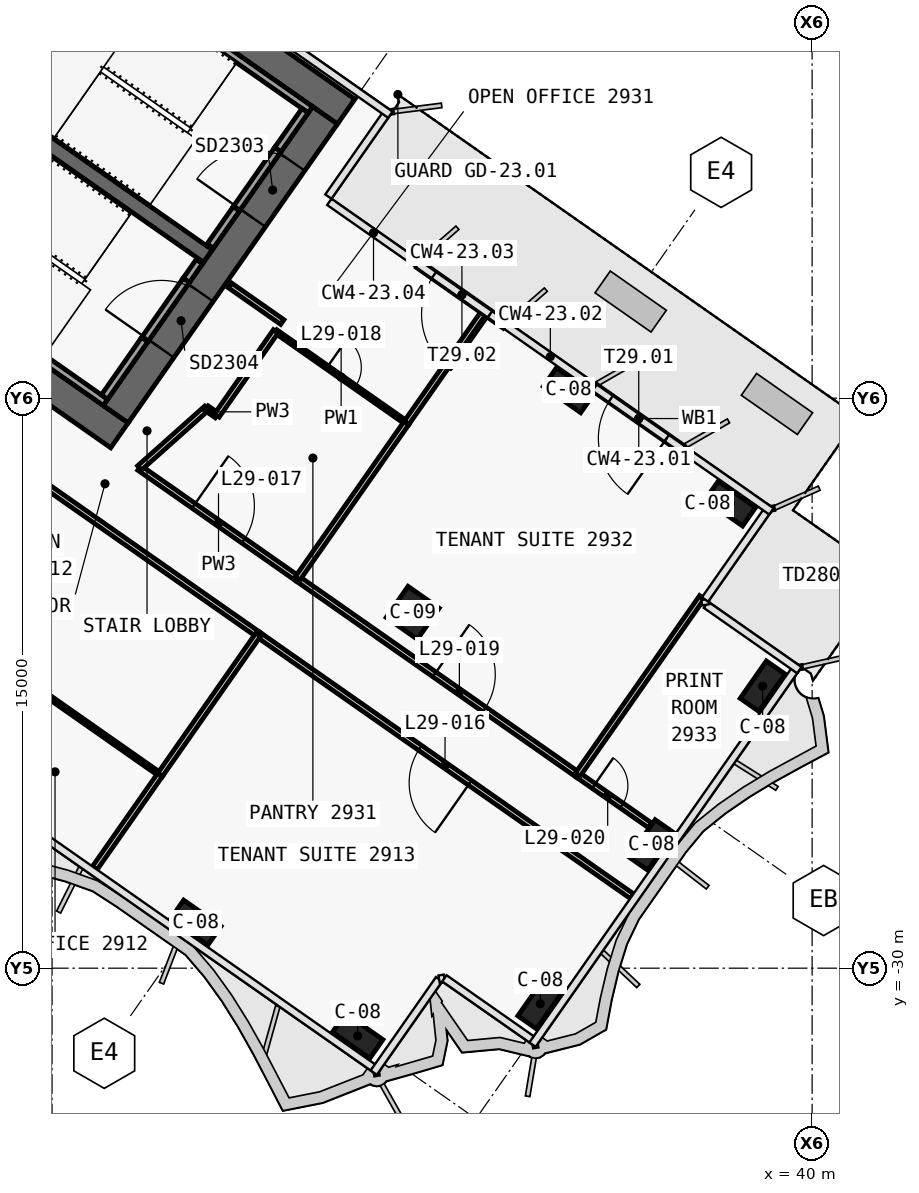
"""IFC4 building model, lengths in metres.
Left out: names, types, materials, properties, quantities, classifications, styles, units other than length and angle.
Written with IfcOpenShell. Run it as: python <this file> out.ifc"""

import sys

from ifc_helpers import new_model, si_unit, direction, frame, frame_2d, origin, origin_2d, place, context, subcontext, project, spatial, polyline, rectangle, outline, extrude, element, fill, save


model = new_model("IFC4")
c1 = context("Model", 3, precision=1e-05, world=origin(), true_north=direction((0.0, 1.0)))
c2 = subcontext(c1, "Body", "Model", "MODEL_VIEW")
j1 = project(units=[si_unit("LENGTHUNIT", "METRE"), si_unit("PLANEANGLEUNIT", "RADIAN")], contexts=[c1])
p1 = place(None, origin())
s1 = spatial("IfcSite", under=j1, at=p1, CompositionType="ELEMENT")
p2 = place(p1, origin())
s2 = spatial("IfcBuilding", under=s1, at=p2, CompositionType="ELEMENT")
p3 = place(p2, frame((0.0, 0.0, 132.0)))
s3 = spatial("IfcBuildingStorey", under=s2, at=p3, CompositionType="ELEMENT", Elevation=132.0)
p4 = place(p3, frame((-0.029, 11.984, 0.0), z_axis=(0.0, 0.0, 1.0), x_axis=(0.819151382952, -0.573577380837, 0.0)))
e1 = element("IfcWall", 1, at=p4, inside=s3, PredefinedType="SHEAR", context=c2, shape_type="SweptSolid", body=[
    extrude(outline(polyline([(33.898, 0.4), (-0.0, 0.4), (0.56, -0.4), (33.898, -0.4), (33.898, 0.4)])), origin(), (0.0, 0.0, 1.0), 3.9),
])
p5 = place(p3, frame((-0.029, -0.712, 0.0), z_axis=(0.0, 0.0, 1.0), x_axis=(0.819151758019, -0.573576845187, 0.0)))
e2 = element("IfcWall", 2, at=p5, inside=s3, PredefinedType="SHEAR", context=c2, shape_type="SweptSolid", body=[
    extrude(outline(polyline([(26.616, 0.4), (-0.0, 0.4), (0.56, -0.4), (26.616, -0.4), (26.616, 0.4)])), origin(), (0.0, 0.0, 1.0), 3.9),
])
p6 = place(p5, frame((6.666, 0.0, 0.0)))
e3 = element("IfcOpeningElement", 3, at=p6, cuts=e2, PredefinedType="OPENING", context=c2, shape_type="SweptSolid", body=[
    extrude(rectangle(XDim=1.5, YDim=2.1, at=frame_2d((0.75, 1.05))), frame((0.0, 0.41, 0.0), z_axis=(0.0, -1.0, 0.0), x_axis=(1.0, 0.0, 0.0)), (0.0, 0.0, 1.0), 0.82),
])
p7 = place(p5, frame((12.366, 0.0, 0.0)))
e4 = element("IfcOpeningElement", 4, at=p7, cuts=e2, PredefinedType="OPENING", context=c2, shape_type="SweptSolid", body=[
    extrude(rectangle(XDim=1.5, YDim=2.1, at=frame_2d((0.75, 1.05))), frame((0.0, 0.41, 0.0), z_axis=(0.0, -1.0, 0.0), x_axis=(1.0, 0.0, 0.0)), (0.0, 0.0, 1.0), 0.82),
])
p8 = place(p3, frame((21.675, -15.421, 0.0), z_axis=(0.0, 0.0, 1.0), x_axis=(0.573581815061, 0.819148278049, 0.0)))
e5 = element("IfcWall", 5, at=p8, inside=s3, PredefinedType="SHEAR", context=c2, shape_type="SweptSolid", body=[
    extrude(outline(polyline([(9.6, 0.4), (0.0, 0.4), (0.0, -0.4), (9.6, -0.4), (9.6, 0.4)])), origin(), (0.0, 0.0, 1.0), 3.9),
])
p9 = place(p8, frame((6.3, 0.0, 0.0)))
e6 = element("IfcOpeningElement", 6, at=p9, cuts=e5, PredefinedType="OPENING", context=c2, shape_type="SweptSolid", body=[
    extrude(rectangle(XDim=1.8, YDim=2.1, at=frame_2d((0.9, 1.05))), frame((0.0, 0.41, 0.0), z_axis=(0.0, -1.0, 0.0), x_axis=(1.0, 0.0, 0.0)), (0.0, 0.0, 1.0), 0.82),
])
p10 = place(p8, frame((2.1, 0.0, 0.0)))
e7 = element("IfcOpeningElement", 7, at=p10, cuts=e5, PredefinedType="OPENING", context=c2, shape_type="SweptSolid", body=[
    extrude(rectangle(XDim=1.8, YDim=2.1, at=frame_2d((0.9, 1.05))), frame((0.0, 0.41, 0.0), z_axis=(0.0, -1.0, 0.0), x_axis=(1.0, 0.0, 0.0)), (0.0, 0.0, 1.0), 0.82),
])
p11 = place(p3, frame((17.498, -6.392, 0.0), z_axis=(0.0, 0.0, 1.0), x_axis=(0.573611936273, 0.819127185829, 0.0)))
e8 = element("IfcWall", 8, at=p11, inside=s3, PredefinedType="SHEAR", context=c2, shape_type="SweptSolid", body=[
    extrude(outline(polyline([(4.6, -0.2), (4.6, 0.2), (0.0, 0.2), (0.0, -0.2), (4.6, -0.2)])), origin(), (0.0, 0.0, 1.0), 3.9),
])
p12 = place(p3, frame((2.638, 3.768, 0.0), z_axis=(0.0, 0.0, 1.0), x_axis=(0.81915267502, -0.573575535572, 0.0)))
e9 = element("IfcWall", 9, at=p12, inside=s3, PredefinedType="SHEAR", context=c2, shape_type="SweptSolid", body=[
    extrude(outline(polyline([(0.0, 0.2), (0.0, -0.2), (26.2, -0.2), (26.2, 0.2), (0.0, 0.2)])), origin(), (0.0, 0.0, 1.0), 3.9),
])
p13 = place(p12, frame((9.637, 0.0, 0.0)))
e10 = element("IfcOpeningElement", 10, at=p13, cuts=e9, PredefinedType="OPENING", context=c2, shape_type="SweptSolid", body=[
    extrude(rectangle(XDim=1.2, YDim=2.1, at=frame_2d((0.6, 1.05))), frame((0.0, 0.21, 0.0), z_axis=(0.0, -1.0, 0.0), x_axis=(1.0, 0.0, 0.0)), (0.0, 0.0, 1.0), 0.42),
])
p14 = place(p12, frame((11.812, 0.0, 0.0)))
e11 = element("IfcOpeningElement", 11, at=p14, cuts=e9, PredefinedType="OPENING", context=c2, shape_type="SweptSolid", body=[
    extrude(rectangle(XDim=1.2, YDim=2.1, at=frame_2d((0.6, 1.05))), frame((0.0, 0.21, 0.0), z_axis=(0.0, -1.0, 0.0), x_axis=(1.0, 0.0, 0.0)), (0.0, 0.0, 1.0), 0.42),
])
p15 = place(p12, frame((13.988, 0.0, 0.0)))
e12 = element("IfcOpeningElement", 12, at=p15, cuts=e9, PredefinedType="OPENING", context=c2, shape_type="SweptSolid", body=[
    extrude(rectangle(XDim=1.2, YDim=2.1, at=frame_2d((0.6, 1.05))), frame((0.0, 0.21, 0.0), z_axis=(0.0, -1.0, 0.0), x_axis=(1.0, 0.0, 0.0)), (0.0, 0.0, 1.0), 0.42),
])
p16 = place(p12, frame((16.262, 0.0, 0.0)))
e13 = element("IfcOpeningElement", 13, at=p16, cuts=e9, PredefinedType="OPENING", context=c2, shape_type="SweptSolid", body=[
    extrude(rectangle(XDim=1.0, YDim=2.1, at=frame_2d((0.5, 1.05))), frame((0.0, 0.21, 0.0), z_axis=(0.0, -1.0, 0.0), x_axis=(1.0, 0.0, 0.0)), (0.0, 0.0, 1.0), 0.42),
])
for number, where, z_axis, x_axis in (
    (14, (23.782, -28.799, 0.0), (0.0, 0.0, 1.0), (0.819, -0.574, 0.0)),
    (15, (28.042, -31.782, 0.0), (0.0, 0.0, 1.0), (0.819, -0.574, 0.0)),
    (16, (33.591, -14.792, 0.0), (0.0, 0.0, 1.0), (0.819, -0.574, 0.0)),
    (17, (37.85, -17.774, 0.0), (0.0, 0.0, 1.0), (0.819, -0.574, 0.0)),
    (18, (32.847, -30.935, 0.0), (0.0, 0.0, 1.0), (0.574, 0.819, 0.0)),
    (19, (35.772, -26.757, 0.0), (0.0, 0.0, 1.0), (0.574, 0.819, 0.0)),
    (20, (38.698, -22.579, 0.0), (0.0, 0.0, 1.0), (0.574, 0.819, 0.0)),
):
    element("IfcColumn", number, at=place(p3, frame(where, z_axis=z_axis, x_axis=x_axis)), inside=s3, PredefinedType="COLUMN", context=c2, shape_type="SweptSolid", body=[
        extrude(rectangle(XDim=1.2, YDim=0.6, at=origin_2d()), origin(), (0.0, 0.0, 1.0), 3.9),
    ])
p17 = place(p3, frame((29.49, -20.649, 0.0), z_axis=(0.0, 0.0, 1.0), x_axis=(0.819152044289, -0.573576436351, 0.0)))
e21 = element("IfcColumn", 21, at=p17, inside=s3, PredefinedType="COLUMN", context=c2, shape_type="SweptSolid", body=[
    extrude(rectangle(XDim=1.0, YDim=1.0, at=origin_2d()), origin(), (0.0, 0.0, 1.0), 3.9),
])
p18 = place(p3, frame((20.243, -2.821, 0.0), z_axis=(0.0, 0.0, 1.0), x_axis=(0.819141584393, -0.57359137434, 0.0)))
e22 = element("IfcWall", 22, at=p18, inside=s3, PredefinedType="SOLIDWALL", context=c2, shape_type="SweptSolid", body=[
    extrude(rectangle(XDim=8.0, YDim=0.2, at=frame_2d((4.0, 0.0))), origin(), (0.0, 0.0, 1.0), 3.62),
])
p19 = place(p3, frame((24.162, -10.998, 0.0), z_axis=(0.0, 0.0, 1.0), x_axis=(0.573612502218, 0.819126789514, 0.0)))
e23 = element("IfcWall", 23, at=p19, inside=s3, PredefinedType="SOLIDWALL", context=c2, shape_type="SweptSolid", body=[
    extrude(rectangle(XDim=1.2, YDim=0.2, at=frame_2d((0.6, 0.0))), origin(), (0.0, 0.0, 1.0), 3.62),
])
p20 = place(p3, frame((25.94, -8.458, 0.0), z_axis=(0.0, 0.0, 1.0), x_axis=(0.573619628835, 0.819121798889, 0.0)))
e24 = element("IfcWall", 24, at=p20, inside=s3, PredefinedType="SOLIDWALL", context=c2, shape_type="SweptSolid", body=[
    extrude(rectangle(XDim=1.25, YDim=0.2, at=frame_2d((0.625, 0.0))), origin(), (0.0, 0.0, 1.0), 3.62),
])
p21 = place(p3, frame((24.85, -10.014, 2.15), z_axis=(0.0, 0.0, 1.0), x_axis=(0.573505465124, 0.819201734296, 0.0)))
e25 = element("IfcWall", 25, at=p21, inside=s3, PredefinedType="SOLIDWALL", context=c2, shape_type="SweptSolid", body=[
    extrude(rectangle(XDim=1.9, YDim=0.2, at=frame_2d((0.95, 0.0))), origin(), (0.0, 0.0, 1.0), 1.47),
])
p22 = place(p3, frame((14.851, -10.521, 0.0), z_axis=(0.0, 0.0, 1.0), x_axis=(0.819141584393, -0.57359137434, 0.0)))
e26 = element("IfcWall", 26, at=p22, inside=s3, PredefinedType="SOLIDWALL", context=c2, shape_type="SweptSolid", body=[
    extrude(rectangle(XDim=8.0, YDim=0.2, at=frame_2d((4.0, 0.0))), origin(), (0.0, 0.0, 1.0), 3.62),
])
p23 = place(p3, frame((21.38, -14.97, 0.0), z_axis=(0.0, 0.0, 1.0), x_axis=(0.573559770908, 0.819163713305, 0.0)))
e27 = element("IfcWall", 27, at=p23, inside=s3, PredefinedType="SOLIDWALL", context=c2, shape_type="SweptSolid", body=[
    extrude(rectangle(XDim=1.85, YDim=0.2, at=frame_2d((0.925, 0.0))), origin(), (0.0, 0.0, 1.0), 3.62),
])
p24 = place(p3, frame((23.531, -11.898, 0.0), z_axis=(0.0, 0.0, 1.0), x_axis=(0.573708088123, 0.819059844958, 0.0)))
e28 = element("IfcWall", 28, at=p24, inside=s3, PredefinedType="SOLIDWALL", context=c2, shape_type="SweptSolid", body=[
    extrude(rectangle(XDim=0.6, YDim=0.2, at=frame_2d((0.3, 0.0))), origin(), (0.0, 0.0, 1.0), 3.62),
])
p25 = place(p3, frame((22.441, -13.455, 2.15), z_axis=(0.0, 0.0, 1.0), x_axis=(0.573591692345, 0.819141361715, 0.0)))
e29 = element("IfcWall", 29, at=p25, inside=s3, PredefinedType="SOLIDWALL", context=c2, shape_type="SweptSolid", body=[
    extrude(rectangle(XDim=1.9, YDim=0.2, at=frame_2d((0.95, 0.0))), origin(), (0.0, 0.0, 1.0), 1.47),
])
p26 = place(p3, frame((36.576, -16.333, 0.0), z_axis=(0.0, 0.0, 1.0), x_axis=(-0.81917415632, 0.573544855802, 0.0)))
e30 = element("IfcWall", 30, at=p26, inside=s3, PredefinedType="SOLIDWALL", context=c2, shape_type="SweptSolid", body=[
    extrude(rectangle(XDim=2.78, YDim=0.2, at=frame_2d((1.39, 0.0))), origin(), (0.0, 0.0, 1.0), 3.62),
])
p27 = place(p26, frame((0.49, 0.0, 0.0)))
e31 = element("IfcOpeningElement", 31, at=p27, cuts=e30, PredefinedType="OPENING", context=c2, shape_type="SweptSolid", body=[
    extrude(rectangle(XDim=1.8, YDim=2.4, at=frame_2d((0.9, 1.2))), frame((0.0, 0.11, 0.0), z_axis=(0.0, -1.0, 0.0), x_axis=(1.0, 0.0, 0.0)), (0.0, 0.0, 1.0), 0.22),
])
p28 = place(p3, frame((31.924, -13.075, 0.0), z_axis=(0.0, 0.0, 1.0), x_axis=(-0.819145264869, 0.573586118244, 0.0)))
e32 = element("IfcWall", 32, at=p28, inside=s3, PredefinedType="SOLIDWALL", context=c2, shape_type="SweptSolid", body=[
    extrude(rectangle(XDim=2.78, YDim=0.2, at=frame_2d((1.39, 0.0))), origin(), (0.0, 0.0, 1.0), 3.62),
])
p29 = place(p28, frame((0.49, 0.0, 0.0)))
e33 = element("IfcOpeningElement", 33, at=p29, cuts=e32, PredefinedType="OPENING", context=c2, shape_type="SweptSolid", body=[
    extrude(rectangle(XDim=1.8, YDim=2.4, at=frame_2d((0.9, 1.2))), frame((0.0, 0.11, 0.0), z_axis=(0.0, -1.0, 0.0), x_axis=(1.0, 0.0, 0.0)), (0.0, 0.0, 1.0), 0.22),
])
p30 = place(p3, frame((22.3, -16.835, 0.0), z_axis=(0.0, 0.0, 1.0), x_axis=(0.819173202411, -0.573546218235, 0.0)))
e34 = element("IfcWall", 34, at=p30, inside=s3, PredefinedType="PARTITIONING", context=c2, shape_type="SweptSolid", body=[
    extrude(rectangle(XDim=5.079, YDim=0.15, at=frame_2d((2.54, 0.0))), origin(), (0.0, 0.0, 1.0), 3.0),
])
p31 = place(p30, frame((1.74, 0.0, 0.0)))
e35 = element("IfcOpeningElement", 35, at=p31, cuts=e34, PredefinedType="OPENING", context=c2, shape_type="SweptSolid", body=[
    extrude(rectangle(XDim=1.6, YDim=2.1, at=frame_2d((0.8, 1.05))), frame((0.0, 0.085, 0.0), z_axis=(0.0, -1.0, 0.0), x_axis=(1.0, 0.0, 0.0)), (0.0, 0.0, 1.0), 0.17),
])
p32 = place(p3, frame((26.457, -19.746, 0.0), z_axis=(0.0, 0.0, 1.0), x_axis=(0.819164400877, -0.57355878891, 0.0)))
e36 = element("IfcWall", 36, at=p32, inside=s3, PredefinedType="PARTITIONING", context=c2, shape_type="SweptSolid", body=[
    extrude(rectangle(XDim=9.004, YDim=0.15, at=frame_2d((4.502, 0.0))), origin(), (0.0, 0.0, 1.0), 3.0),
])
p33 = place(p32, frame((4.402, 0.0, 0.0)))
e37 = element("IfcOpeningElement", 37, at=p33, cuts=e36, PredefinedType="OPENING", context=c2, shape_type="SweptSolid", body=[
    extrude(rectangle(XDim=1.6, YDim=2.1, at=frame_2d((0.8, 1.05))), frame((0.0, 0.085, 0.0), z_axis=(0.0, -1.0, 0.0), x_axis=(1.0, 0.0, 0.0)), (0.0, 0.0, 1.0), 0.17),
])
p34 = place(p3, frame((33.829, -24.908, 0.0), z_axis=(0.0, 0.0, 1.0), x_axis=(0.81915814261, -0.573567726947, 0.0)))
e38 = element("IfcWall", 38, at=p34, inside=s3, PredefinedType="PARTITIONING", context=c2, shape_type="SweptSolid", body=[
    extrude(rectangle(XDim=2.332, YDim=0.15, at=frame_2d((1.166, 0.0))), origin(), (0.0, 0.0, 1.0), 3.0),
])
p35 = place(p34, frame((0.516, 0.0, 0.0)))
e39 = element("IfcOpeningElement", 39, at=p35, cuts=e38, PredefinedType="OPENING", context=c2, shape_type="SweptSolid", body=[
    extrude(rectangle(XDim=0.9, YDim=2.1, at=frame_2d((0.45, 1.05))), frame((0.0, 0.085, 0.0), z_axis=(0.0, -1.0, 0.0), x_axis=(1.0, 0.0, 0.0)), (0.0, 0.0, 1.0), 0.17),
])
p36 = place(p3, frame((25.428, -21.222, 0.0), z_axis=(0.0, 0.0, 1.0), x_axis=(-0.819170120389, 0.573550620139, 0.0)))
e40 = element("IfcWall", 40, at=p36, inside=s3, PredefinedType="PARTITIONING", context=c2, shape_type="SweptSolid", body=[
    extrude(rectangle(XDim=18.004, YDim=0.15, at=frame_2d((9.002, 0.0))), origin(), (0.0, 0.0, 1.0), 3.0),
])
p37 = place(p36, frame((8.202, 0.0, 0.0)))
e41 = element("IfcOpeningElement", 41, at=p37, cuts=e40, PredefinedType="OPENING", context=c2, shape_type="SweptSolid", body=[
    extrude(rectangle(XDim=1.6, YDim=2.1, at=frame_2d((0.8, 1.05))), frame((0.0, 0.085, 0.0), z_axis=(0.0, -1.0, 0.0), x_axis=(1.0, 0.0, 0.0)), (0.0, 0.0, 1.0), 0.17),
])
p38 = place(p3, frame((35.256, -28.104, 0.0), z_axis=(0.0, 0.0, 1.0), x_axis=(-0.819174576401, 0.573544255814, 0.0)))
e42 = element("IfcWall", 42, at=p38, inside=s3, PredefinedType="PARTITIONING", context=c2, shape_type="SweptSolid", body=[
    extrude(rectangle(XDim=12.002, YDim=0.15, at=frame_2d((6.001, 0.0))), origin(), (0.0, 0.0, 1.0), 2.9),
])
p39 = place(p38, frame((5.201, 0.0, 0.0)))
e43 = element("IfcOpeningElement", 43, at=p39, cuts=e42, PredefinedType="OPENING", context=c2, shape_type="SweptSolid", body=[
    extrude(rectangle(XDim=1.6, YDim=2.1, at=frame_2d((0.8, 1.05))), frame((0.0, 0.085, 0.0), z_axis=(0.0, -1.0, 0.0), x_axis=(1.0, 0.0, 0.0)), (0.0, 0.0, 1.0), 0.17),
])
p40 = place(p3, frame((25.886, -13.242, 0.0), z_axis=(0.0, 0.0, 1.0), x_axis=(0.819160910421, -0.573563773994, 0.0)))
e44 = element("IfcWall", 44, at=p40, inside=s3, PredefinedType="PARTITIONING", context=c2, shape_type="SweptSolid", body=[
    extrude(rectangle(XDim=4.2, YDim=0.1, at=frame_2d((2.1, 0.0))), origin(), (0.0, 0.0, 1.0), 3.62),
])
p41 = place(p40, frame((1.65, 0.0, 0.0)))
e45 = element("IfcOpeningElement", 45, at=p41, cuts=e44, PredefinedType="OPENING", context=c2, shape_type="SweptSolid", body=[
    extrude(rectangle(XDim=0.9, YDim=2.1, at=frame_2d((0.45, 1.05))), frame((0.0, 0.06, 0.0), z_axis=(0.0, -1.0, 0.0), x_axis=(1.0, 0.0, 0.0)), (0.0, 0.0, 1.0), 0.12),
])
p42 = place(p3, frame((31.334, -12.784, 0.0), z_axis=(0.0, 0.0, 1.0), x_axis=(-0.573555999232, -0.819166354134, 0.0)))
e46 = element("IfcWall", 46, at=p42, inside=s3, PredefinedType="PARTITIONING", context=c2, shape_type="SweptSolid", body=[
    extrude(rectangle(XDim=3.499, YDim=0.15, at=frame_2d((1.75, 0.0))), origin(), (0.0, 0.0, 1.0), 3.0),
])
p43 = place(p3, frame((26.058, -12.997, 0.0), z_axis=(0.0, 0.0, 1.0), x_axis=(-0.819109000826, 0.573637903879, 0.0)))
e47 = element("IfcWall", 47, at=p43, inside=s3, PredefinedType="PARTITIONING", context=c2, shape_type="SweptSolid", body=[
    extrude(rectangle(XDim=1.68, YDim=0.15, at=frame_2d((0.84, 0.0))), origin(), (0.0, 0.0, 1.0), 3.62),
])
p44 = place(p3, frame((29.326, -15.651, 0.0), z_axis=(0.0, 0.0, 1.0), x_axis=(-0.573563925118, -0.819160804606, 0.0)))
e48 = element("IfcWall", 48, at=p44, inside=s3, PredefinedType="PARTITIONING", context=c2, shape_type="SweptSolid", body=[
    extrude(rectangle(XDim=5.0, YDim=0.15, at=frame_2d((2.5, 0.0))), origin(), (0.0, 0.0, 1.0), 3.0),
])
p45 = place(p3, frame((22.301, -16.836, 0.0), z_axis=(0.0, 0.0, 1.0), x_axis=(0.746924703007, 0.664908631345, 0.0)))
e49 = element("IfcWall", 49, at=p45, inside=s3, PredefinedType="PARTITIONING", context=c2, shape_type="SweptSolid", body=[
    extrude(rectangle(XDim=2.364, YDim=0.15, at=frame_2d((1.182, 0.0))), origin(), (0.0, 0.0, 1.0), 3.0),
])
p46 = place(p3, frame((24.067, -15.265, 0.0), z_axis=(0.0, 0.0, 1.0), x_axis=(0.819092976344, -0.573660784876, 0.0)))
e50 = element("IfcWall", 50, at=p46, inside=s3, PredefinedType="PARTITIONING", context=c2, shape_type="SweptSolid", body=[
    extrude(rectangle(XDim=0.33, YDim=0.15, at=frame_2d((0.165, 0.0))), origin(), (0.0, 0.0, 1.0), 3.62),
])
p47 = place(p3, frame((24.337, -15.454, 0.0), z_axis=(0.0, 0.0, 1.0), x_axis=(0.573626181702, 0.819117209968, 0.0)))
e51 = element("IfcWall", 51, at=p47, inside=s3, PredefinedType="PARTITIONING", context=c2, shape_type="SweptSolid", body=[
    extrude(rectangle(XDim=2.7, YDim=0.15, at=frame_2d((1.35, 0.0))), origin(), (0.0, 0.0, 1.0), 3.62),
])
p48 = place(p3, frame((37.101, -20.239, 0.0), z_axis=(0.0, 0.0, 1.0), x_axis=(-0.573565788323, -0.819159500015, 0.0)))
e52 = element("IfcWall", 52, at=p48, inside=s3, PredefinedType="PARTITIONING", context=c2, shape_type="SweptSolid", body=[
    extrude(rectangle(XDim=5.702, YDim=0.15, at=frame_2d((2.851, 0.0))), origin(), (0.0, 0.0, 1.0), 3.0),
])
p49 = place(p3, frame((22.844, -24.909, 0.0), z_axis=(0.0, 0.0, 1.0), x_axis=(-0.81914780044, 0.573582497149, 0.0)))
e53 = element("IfcWall", 53, at=p49, inside=s3, PredefinedType="PARTITIONING", context=c2, shape_type="SweptSolid", body=[
    extrude(rectangle(XDim=18.0, YDim=0.1, at=frame_2d((9.0, 0.0))), origin(), (0.0, 0.0, 1.0), 3.0),
])
p50 = place(p49, frame((8.55, 0.0, 0.0)))
e54 = element("IfcOpeningElement", 54, at=p50, cuts=e53, PredefinedType="OPENING", context=c2, shape_type="SweptSolid", body=[
    extrude(rectangle(XDim=0.9, YDim=2.1, at=frame_2d((0.45, 1.05))), frame((0.0, 0.06, 0.0), z_axis=(0.0, -1.0, 0.0), x_axis=(1.0, 0.0, 0.0)), (0.0, 0.0, 1.0), 0.12),
])
p51 = place(p3, frame((22.844, -24.909, 0.0), z_axis=(0.0, 0.0, 1.0), x_axis=(-0.573549763719, -0.81917072002, 0.0)))
e55 = element("IfcWall", 55, at=p51, inside=s3, PredefinedType="PARTITIONING", context=c2, shape_type="SweptSolid", body=[
    extrude(rectangle(XDim=2.999, YDim=0.15, at=frame_2d((1.5, 0.0))), origin(), (0.0, 0.0, 1.0), 2.9),
])
p52 = place(p3, frame((25.426, -21.222, 0.0), z_axis=(0.0, 0.0, 1.0), x_axis=(-0.573586141663, -0.819145248471, 0.0)))
e56 = element("IfcWall", 56, at=p52, inside=s3, PredefinedType="PARTITIONING", context=c2, shape_type="SweptSolid", body=[
    extrude(rectangle(XDim=4.5, YDim=0.15, at=frame_2d((2.25, 0.0))), origin(), (0.0, 0.0, 1.0), 3.62),
])
p53 = place(p9, origin())
e57 = element("IfcDoor", 57, at=p53, inside=s3, OperationType="DOUBLE_DOOR_SINGLE_SWING", PredefinedType="DOOR", context=c2, shape_type="SweptSolid", body=[
    extrude(rectangle(XDim=1.8, YDim=2.1, at=frame_2d((0.9, 1.05))), frame((0.0, 0.025, 0.0), z_axis=(0.0, -1.0, 0.0), x_axis=(1.0, 0.0, 0.0)), (0.0, 0.0, 1.0), 0.05),
])
fill(e6, e57)
p54 = place(p10, origin())
e58 = element("IfcDoor", 58, at=p54, inside=s3, OperationType="DOUBLE_DOOR_SINGLE_SWING", PredefinedType="DOOR", context=c2, shape_type="SweptSolid", body=[
    extrude(rectangle(XDim=1.8, YDim=2.1, at=frame_2d((0.9, 1.05))), frame((0.0, 0.025, 0.0), z_axis=(0.0, -1.0, 0.0), x_axis=(1.0, 0.0, 0.0)), (0.0, 0.0, 1.0), 0.05),
])
fill(e7, e58)
p55 = place(p27, origin())
e59 = element("IfcDoor", 59, at=p55, inside=s3, OperationType="DOUBLE_DOOR_DOUBLE_SWING", PredefinedType="DOOR", context=c2, shape_type="SweptSolid", body=[
    extrude(rectangle(XDim=1.8, YDim=2.4, at=frame_2d((0.9, 1.2))), frame((0.0, 0.025, 0.0), z_axis=(0.0, -1.0, 0.0), x_axis=(1.0, 0.0, 0.0)), (0.0, 0.0, 1.0), 0.05),
])
fill(e31, e59)
p56 = place(p29, origin())
e60 = element("IfcDoor", 60, at=p56, inside=s3, OperationType="DOUBLE_DOOR_DOUBLE_SWING", PredefinedType="DOOR", context=c2, shape_type="SweptSolid", body=[
    extrude(rectangle(XDim=1.8, YDim=2.4, at=frame_2d((0.9, 1.2))), frame((0.0, 0.025, 0.0), z_axis=(0.0, -1.0, 0.0), x_axis=(1.0, 0.0, 0.0)), (0.0, 0.0, 1.0), 0.05),
])
fill(e33, e60)
p57 = place(p39, origin())
e61 = element("IfcDoor", 61, at=p57, inside=s3, OperationType="DOUBLE_DOOR_SINGLE_SWING", PredefinedType="DOOR", context=c2, shape_type="SweptSolid", body=[
    extrude(rectangle(XDim=1.6, YDim=2.1, at=frame_2d((0.8, 1.05))), frame((0.0, 0.025, 0.0), z_axis=(0.0, -1.0, 0.0), x_axis=(1.0, 0.0, 0.0)), (0.0, 0.0, 1.0), 0.05),
])
fill(e43, e61)
p58 = place(p31, origin())
e62 = element("IfcDoor", 62, at=p58, inside=s3, OperationType="DOUBLE_DOOR_SINGLE_SWING", PredefinedType="DOOR", context=c2, shape_type="SweptSolid", body=[
    extrude(rectangle(XDim=1.6, YDim=2.1, at=frame_2d((0.8, 1.05))), frame((0.0, 0.025, 0.0), z_axis=(0.0, -1.0, 0.0), x_axis=(1.0, 0.0, 0.0)), (0.0, 0.0, 1.0), 0.05),
])
fill(e35, e62)
p59 = place(p41, origin())
e63 = element("IfcDoor", 63, at=p59, inside=s3, OperationType="SINGLE_SWING_LEFT", PredefinedType="DOOR", context=c2, shape_type="SweptSolid", body=[
    extrude(rectangle(XDim=0.9, YDim=2.1, at=frame_2d((0.45, 1.05))), frame((0.0, 0.025, 0.0), z_axis=(0.0, -1.0, 0.0), x_axis=(1.0, 0.0, 0.0)), (0.0, 0.0, 1.0), 0.05),
])
fill(e45, e63)
p60 = place(p33, origin())
e64 = element("IfcDoor", 64, at=p60, inside=s3, OperationType="DOUBLE_DOOR_SINGLE_SWING", PredefinedType="DOOR", context=c2, shape_type="SweptSolid", body=[
    extrude(rectangle(XDim=1.6, YDim=2.1, at=frame_2d((0.8, 1.05))), frame((0.0, 0.025, 0.0), z_axis=(0.0, -1.0, 0.0), x_axis=(1.0, 0.0, 0.0)), (0.0, 0.0, 1.0), 0.05),
])
fill(e37, e64)
p61 = place(p35, origin())
e65 = element("IfcDoor", 65, at=p61, inside=s3, OperationType="SINGLE_SWING_RIGHT", PredefinedType="DOOR", context=c2, shape_type="SweptSolid", body=[
    extrude(rectangle(XDim=0.9, YDim=2.1, at=frame_2d((0.45, 1.05))), frame((0.0, 0.025, 0.0), z_axis=(0.0, -1.0, 0.0), x_axis=(1.0, 0.0, 0.0)), (0.0, 0.0, 1.0), 0.05),
])
fill(e39, e65)
save(model, sys.argv[1])
